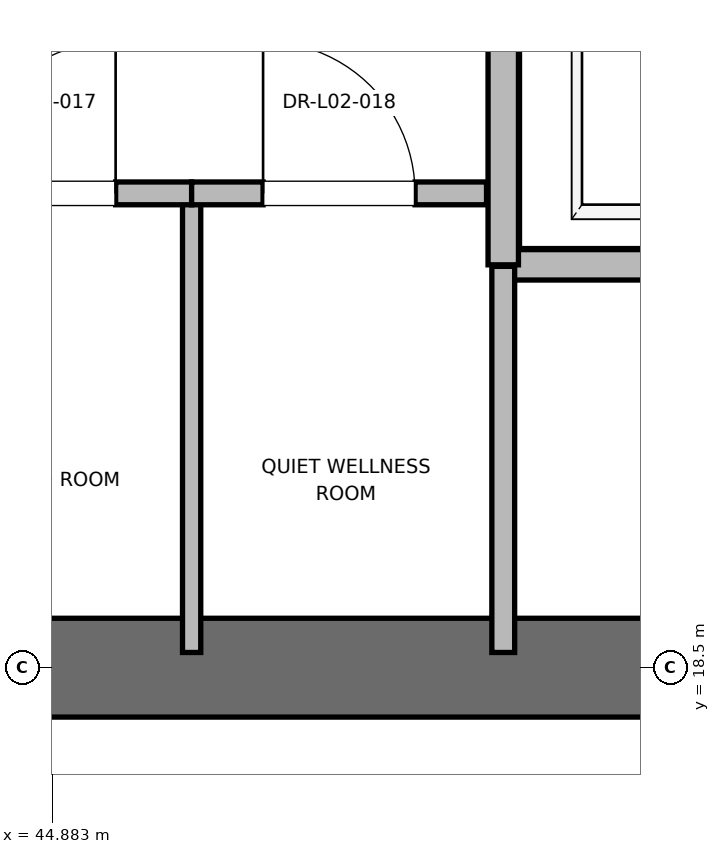
"""IFC4 building model, lengths in metres.
Left out: names, types, materials, properties, quantities, classifications, styles, units other than length and angle.
Written with IfcOpenShell. Run it as: python <this file> out.ifc"""

import sys

from ifc_helpers import new_model, si_unit, direction, frame, frame_2d, origin, place, context, subcontext, project, spatial, rectangle, extrude, element, fill, save


model = new_model("IFC4")
c1 = context("Model", 3, precision=1e-05, world=origin(), true_north=direction((0.0, 1.0)))
c2 = subcontext(c1, "Body", "Model", "MODEL_VIEW")
j1 = project(units=[si_unit("LENGTHUNIT", "METRE"), si_unit("PLANEANGLEUNIT", "RADIAN")], contexts=[c1])
p1 = place(None, origin())
s1 = spatial("IfcSite", under=j1, at=p1, CompositionType="ELEMENT")
p2 = place(p1, origin())
s2 = spatial("IfcBuilding", under=s1, at=p2, CompositionType="ELEMENT")
p3 = place(p2, frame((0.0, 0.0, 11.2)))
s3 = spatial("IfcBuildingStorey", under=s2, at=p3, CompositionType="ELEMENT", Elevation=11.2)
p4 = place(p3, frame((41.8, 18.5, 0.0), z_axis=(0.0, 0.0, 1.0), x_axis=(1.0, 0.0, 0.0)))
e1 = element("IfcWall", 1, at=p4, inside=s3, PredefinedType="SHEAR", context=c2, shape_type="SweptSolid", body=[
    extrude(rectangle(XDim=9.2, YDim=0.65, at=frame_2d((4.6, 0.0))), origin(), (0.0, 0.0, 1.0), 4.92),
])
p5 = place(p3, frame((47.85, 21.15, 0.0), z_axis=(0.0, 0.0, 1.0), x_axis=(1.0, 0.0, 0.0)))
e2 = element("IfcWall", 2, at=p5, inside=s3, PredefinedType="SOLIDWALL", context=c2, shape_type="SweptSolid", body=[
    extrude(rectangle(XDim=2.6, YDim=0.2, at=frame_2d((1.3, 0.0))), origin(), (0.0, 0.0, 1.0), 4.92),
])
p6 = place(p3, frame((47.85, 24.15, 0.0), z_axis=(0.0, 0.0, 1.0), x_axis=(0.0, -1.0, 0.0)))
e3 = element("IfcWall", 3, at=p6, inside=s3, PredefinedType="SOLIDWALL", context=c2, shape_type="SweptSolid", body=[
    extrude(rectangle(XDim=3.0, YDim=0.2, at=frame_2d((1.5, 0.0))), origin(), (0.0, 0.0, 1.0), 4.92),
])
p7 = place(p3, frame((47.85, 18.6, 0.0), z_axis=(0.0, 0.0, 1.0), x_axis=(0.0, 1.0, 0.0)))
e4 = element("IfcWall", 4, at=p7, inside=s3, PredefinedType="PARTITIONING", context=c2, shape_type="SweptSolid", body=[
    extrude(rectangle(XDim=2.54, YDim=0.15, at=frame_2d((1.27, 0.0))), origin(), (0.0, 0.0, 1.0), 2.85),
])
p8 = place(p3, frame((45.8, 18.6, 0.0), z_axis=(0.0, 0.0, 1.0), x_axis=(0.0, 1.0, 0.0)))
e5 = element("IfcWall", 5, at=p8, inside=s3, PredefinedType="PARTITIONING", context=c2, shape_type="SweptSolid", body=[
    extrude(rectangle(XDim=3.02, YDim=0.12, at=frame_2d((1.51, 0.0))), origin(), (0.0, 0.0, 1.0), 2.85),
])
p9 = place(p3, frame((43.8, 21.62, 0.0), z_axis=(0.0, 0.0, 1.0), x_axis=(1.0, 0.0, 0.0)))
e6 = element("IfcWall", 6, at=p9, inside=s3, PredefinedType="PARTITIONING", context=c2, shape_type="SweptSolid", body=[
    extrude(rectangle(XDim=2.0, YDim=0.15, at=frame_2d((1.0, 0.0))), origin(), (0.0, 0.0, 1.0), 2.85),
])
p10 = place(p9, frame((0.5, 0.0, 0.0)))
e7 = element("IfcOpeningElement", 7, at=p10, cuts=e6, PredefinedType="OPENING", context=c2, shape_type="SweptSolid", body=[
    extrude(rectangle(XDim=1.0, YDim=2.15, at=frame_2d((0.5, 1.075))), frame((0.0, 0.075, 0.0), z_axis=(0.0, -1.0, 0.0), x_axis=(1.0, 0.0, 0.0)), (0.0, 0.0, 1.0), 0.15),
])
p11 = place(p3, frame((45.8, 21.62, 0.0), z_axis=(0.0, 0.0, 1.0), x_axis=(1.0, 0.0, 0.0)))
e8 = element("IfcWall", 8, at=p11, inside=s3, PredefinedType="PARTITIONING", context=c2, shape_type="SweptSolid", body=[
    extrude(rectangle(XDim=1.94, YDim=0.15, at=frame_2d((0.97, 0.0))), origin(), (0.0, 0.0, 1.0), 2.85),
])
p12 = place(p11, frame((0.47, 0.0, 0.0)))
e9 = element("IfcOpeningElement", 9, at=p12, cuts=e8, PredefinedType="OPENING", context=c2, shape_type="SweptSolid", body=[
    extrude(rectangle(XDim=1.0, YDim=2.15, at=frame_2d((0.5, 1.075))), frame((0.0, 0.075, 0.0), z_axis=(0.0, -1.0, 0.0), x_axis=(1.0, 0.0, 0.0)), (0.0, 0.0, 1.0), 0.15),
])
p13 = place(p10, origin())
e10 = element("IfcDoor", 10, at=p13, inside=s3, OperationType="SINGLE_SWING_RIGHT", PredefinedType="DOOR", context=c2, shape_type="SweptSolid", body=[
    extrude(rectangle(XDim=1.0, YDim=2.15, at=frame_2d((0.5, 1.075))), frame((0.0, 0.025, 0.0), z_axis=(0.0, -1.0, 0.0), x_axis=(1.0, 0.0, 0.0)), (0.0, 0.0, 1.0), 0.05),
])
fill(e7, e10)
p14 = place(p12, origin())
e11 = element("IfcDoor", 11, at=p14, inside=s3, OperationType="SINGLE_SWING_LEFT", PredefinedType="DOOR", context=c2, shape_type="SweptSolid", body=[
    extrude(rectangle(XDim=1.0, YDim=2.15, at=frame_2d((0.5, 1.075))), frame((0.0, 0.025, 0.0), z_axis=(0.0, -1.0, 0.0), x_axis=(1.0, 0.0, 0.0)), (0.0, 0.0, 1.0), 0.05),
])
fill(e9, e11)
save(model, sys.argv[1])
